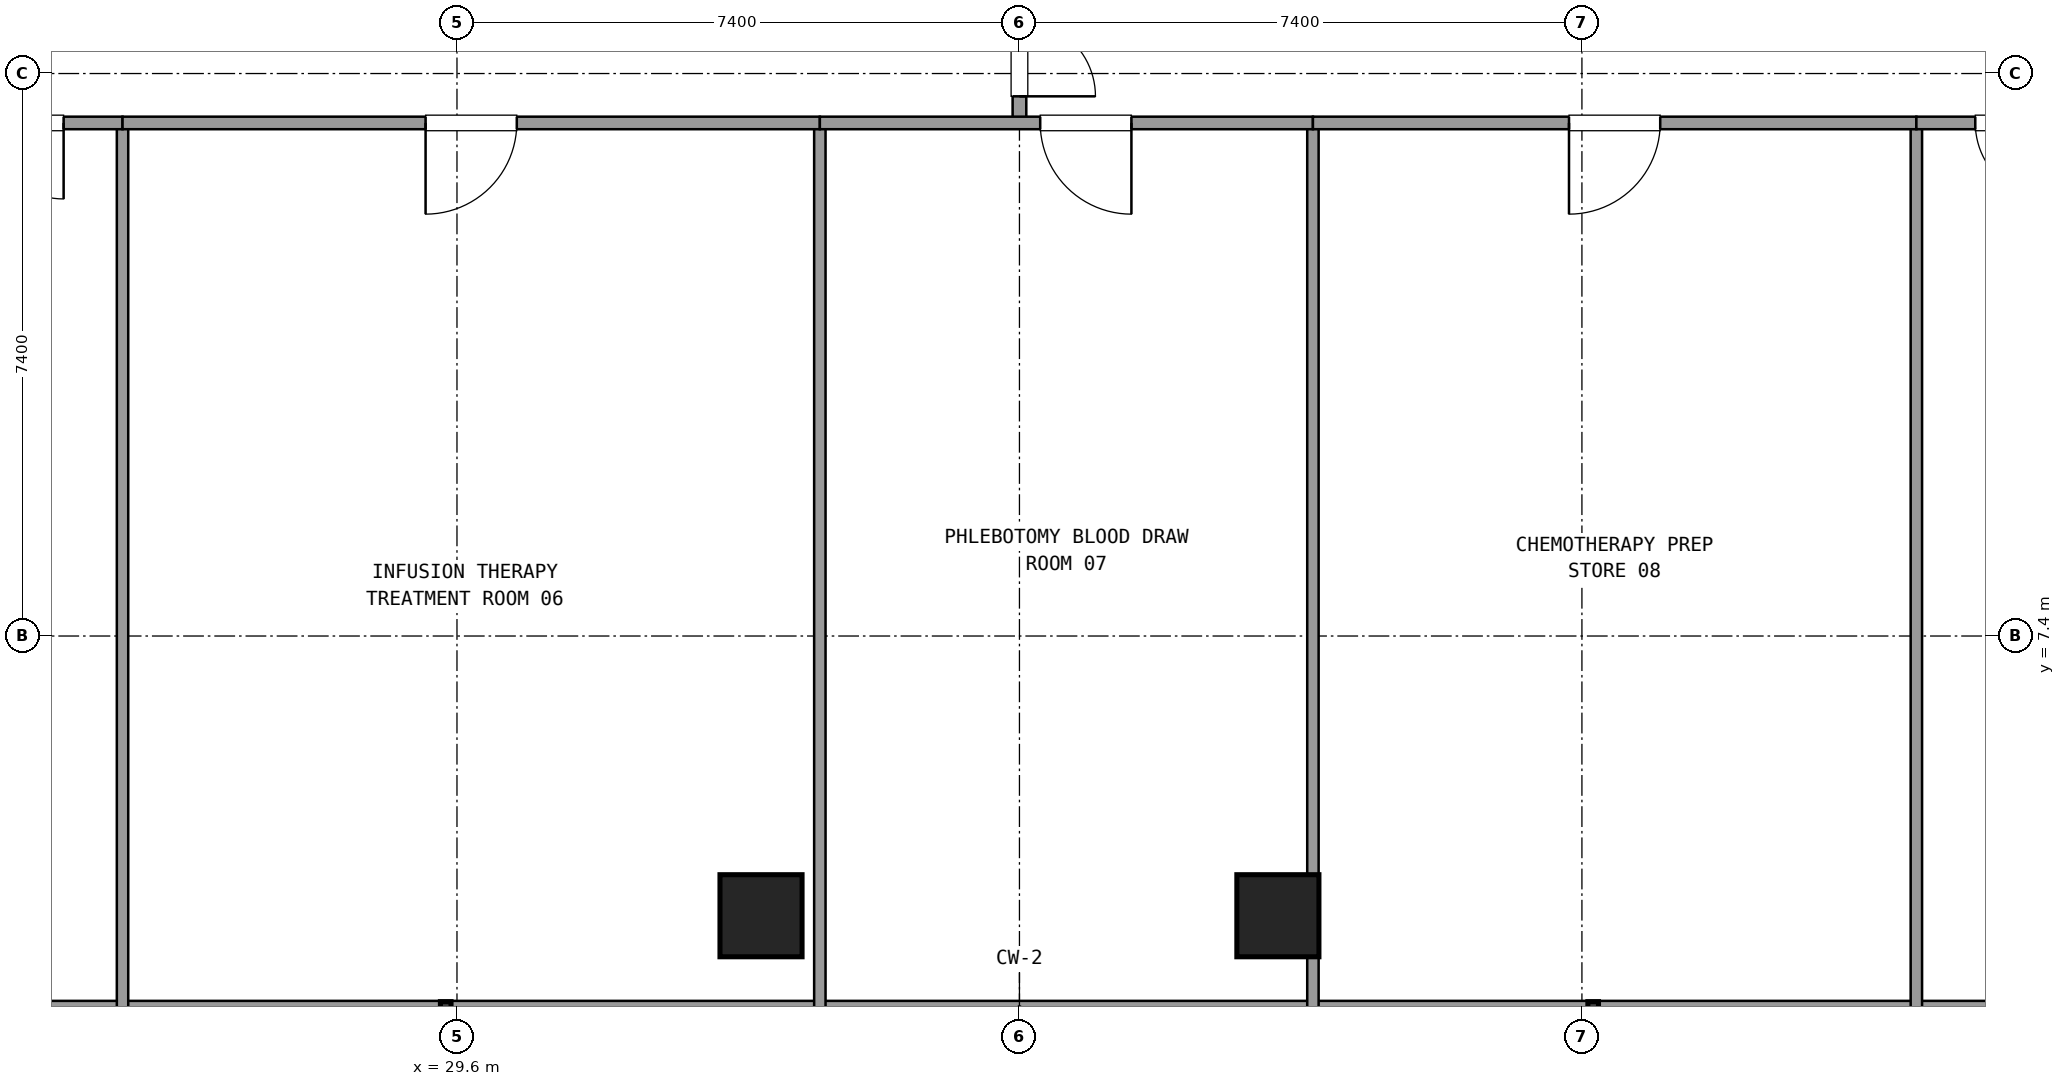
"""IFC4 building model, lengths in metres.
Left out: names, types, materials, properties, quantities, classifications, styles, units other than length and angle.
Written with IfcOpenShell. Run it as: python <this file> out.ifc"""

import sys

from ifc_helpers import new_model, si_unit, direction, frame, frame_2d, origin, origin_2d, place, context, subcontext, project, spatial, rectangle, extrude, element, fill, save


model = new_model("IFC4")
c1 = context("Model", 3, precision=1e-05, world=origin(), true_north=direction((0.0, 1.0)))
c2 = subcontext(c1, "Body", "Model", "MODEL_VIEW")
j1 = project(units=[si_unit("LENGTHUNIT", "METRE"), si_unit("PLANEANGLEUNIT", "RADIAN")], contexts=[c1])
p1 = place(None, origin())
s1 = spatial("IfcSite", under=j1, at=p1, CompositionType="ELEMENT")
p2 = place(p1, origin())
s2 = spatial("IfcBuilding", under=s1, at=p2, CompositionType="ELEMENT")
p3 = place(p2, frame((0.0, 0.0, 59.94)))
s3 = spatial("IfcBuildingStorey", under=s2, at=p3, CompositionType="ELEMENT", Elevation=59.94)
for number, where, z_axis, x_axis in (
    (1, (33.6, 3.72, 0.0), (0.0, 0.0, 1.0), (1.0, 0.0, 0.0)),
    (2, (40.4, 3.72, 0.0), (0.0, 0.0, 1.0), (1.0, 0.0, 0.0)),
):
    element("IfcColumn", number, at=place(p3, frame(where, z_axis=z_axis, x_axis=x_axis)), inside=s3, PredefinedType="COLUMN", context=c2, shape_type="SweptSolid", body=[
        extrude(rectangle(XDim=1.08, YDim=1.08, at=origin_2d()), origin(), (0.0, 0.0, 1.0), 3.6),
    ])
p4 = place(p3, frame((14.355, 2.48, 0.0), z_axis=(0.0, 0.0, 1.0), x_axis=(1.0, 0.0, 0.0)))
e3 = element("IfcWall", 3, at=p4, inside=s3, PredefinedType="SOLIDWALL", context=c2, shape_type="SweptSolid", body=[
    extrude(rectangle(XDim=45.29, YDim=0.24, at=frame_2d((22.645, 0.0))), origin(), (0.0, 0.0, 1.0), 0.85),
])
p5 = place(p3, frame((37.0, 14.15, 0.0), z_axis=(0.0, 0.0, 1.0), x_axis=(0.0, 1.0, 0.0)))
e4 = element("IfcWall", 4, at=p5, inside=s3, PredefinedType="PARTITIONING", context=c2, shape_type="SweptSolid", body=[
    extrude(rectangle(XDim=2.7, YDim=0.18, at=frame_2d((1.35, 0.0))), origin(), (0.0, 0.0, 1.0), 2.61),
])
p6 = place(p5, frame((0.35, 0.0, 0.0)))
e5 = element("IfcOpeningElement", 5, at=p6, cuts=e4, PredefinedType="OPENING", context=c2, shape_type="SweptSolid", body=[
    extrude(rectangle(XDim=2.0, YDim=2.2, at=frame_2d((1.0, 1.1))), frame((0.0, 0.1, 0.0), z_axis=(0.0, -1.0, 0.0), x_axis=(1.0, 0.0, 0.0)), (0.0, 0.0, 1.0), 0.2),
])
p7 = place(p3, frame((25.2, 14.15, 0.0), z_axis=(0.0, 0.0, 1.0), x_axis=(0.0, -1.0, 0.0)))
e6 = element("IfcWall", 6, at=p7, inside=s3, PredefinedType="PARTITIONING", context=c2, shape_type="SweptSolid", body=[
    extrude(rectangle(XDim=11.65, YDim=0.15, at=frame_2d((5.825, 0.0))), origin(), (0.0, 0.0, 1.0), 2.61),
])
p8 = place(p3, frame((22.65, 14.15, 0.0), z_axis=(0.0, 0.0, 1.0), x_axis=(1.0, 0.0, 0.0)))
e7 = element("IfcWall", 7, at=p8, inside=s3, PredefinedType="PARTITIONING", context=c2, shape_type="SweptSolid", body=[
    extrude(rectangle(XDim=2.55, YDim=0.165, at=frame_2d((1.275, 0.0))), origin(), (0.0, 0.0, 1.0), 2.61),
])
p9 = place(p8, frame((0.775, 0.0, 0.0)))
e8 = element("IfcOpeningElement", 8, at=p9, cuts=e7, PredefinedType="OPENING", context=c2, shape_type="SweptSolid", body=[
    extrude(rectangle(XDim=1.0, YDim=2.15, at=frame_2d((0.5, 1.075))), frame((0.0, 0.093, 0.0), z_axis=(0.0, -1.0, 0.0), x_axis=(1.0, 0.0, 0.0)), (0.0, 0.0, 1.0), 0.185),
])
p10 = place(p3, frame((34.374, 14.15, 0.0), z_axis=(0.0, 0.0, 1.0), x_axis=(0.0, -1.0, 0.0)))
e9 = element("IfcWall", 9, at=p10, inside=s3, PredefinedType="PARTITIONING", context=c2, shape_type="SweptSolid", body=[
    extrude(rectangle(XDim=11.65, YDim=0.15, at=frame_2d((5.825, 0.0))), origin(), (0.0, 0.0, 1.0), 2.61),
])
p11 = place(p3, frame((25.2, 14.15, 0.0), z_axis=(0.0, 0.0, 1.0), x_axis=(1.0, 0.0, 0.0)))
e10 = element("IfcWall", 10, at=p11, inside=s3, PredefinedType="PARTITIONING", context=c2, shape_type="SweptSolid", body=[
    extrude(rectangle(XDim=9.174, YDim=0.165, at=frame_2d((4.587, 0.0))), origin(), (0.0, 0.0, 1.0), 2.61),
])
p12 = place(p11, frame((3.987, 0.0, 0.0)))
e11 = element("IfcOpeningElement", 11, at=p12, cuts=e10, PredefinedType="OPENING", context=c2, shape_type="SweptSolid", body=[
    extrude(rectangle(XDim=1.2, YDim=2.15, at=frame_2d((0.6, 1.075))), frame((0.0, 0.093, 0.0), z_axis=(0.0, -1.0, 0.0), x_axis=(1.0, 0.0, 0.0)), (0.0, 0.0, 1.0), 0.185),
])
p13 = place(p3, frame((40.861, 14.15, 0.0), z_axis=(0.0, 0.0, 1.0), x_axis=(0.0, -1.0, 0.0)))
e12 = element("IfcWall", 12, at=p13, inside=s3, PredefinedType="PARTITIONING", context=c2, shape_type="SweptSolid", body=[
    extrude(rectangle(XDim=11.65, YDim=0.15, at=frame_2d((5.825, 0.0))), origin(), (0.0, 0.0, 1.0), 2.61),
])
p14 = place(p3, frame((34.374, 14.15, 0.0), z_axis=(0.0, 0.0, 1.0), x_axis=(1.0, 0.0, 0.0)))
e13 = element("IfcWall", 13, at=p14, inside=s3, PredefinedType="PARTITIONING", context=c2, shape_type="SweptSolid", body=[
    extrude(rectangle(XDim=6.487, YDim=0.165, at=frame_2d((3.244, 0.0))), origin(), (0.0, 0.0, 1.0), 2.61),
])
p15 = place(p14, frame((2.899, 0.0, 0.0)))
e14 = element("IfcOpeningElement", 14, at=p15, cuts=e13, PredefinedType="OPENING", context=c2, shape_type="SweptSolid", body=[
    extrude(rectangle(XDim=1.2, YDim=2.15, at=frame_2d((0.6, 1.075))), frame((0.0, 0.093, 0.0), z_axis=(0.0, -1.0, 0.0), x_axis=(1.0, 0.0, 0.0)), (0.0, 0.0, 1.0), 0.185),
])
p16 = place(p3, frame((48.8, 14.15, 0.0), z_axis=(0.0, 0.0, 1.0), x_axis=(0.0, -1.0, 0.0)))
e15 = element("IfcWall", 15, at=p16, inside=s3, PredefinedType="PARTITIONING", context=c2, shape_type="SweptSolid", body=[
    extrude(rectangle(XDim=11.65, YDim=0.15, at=frame_2d((5.825, 0.0))), origin(), (0.0, 0.0, 1.0), 2.61),
])
p17 = place(p3, frame((40.861, 14.15, 0.0), z_axis=(0.0, 0.0, 1.0), x_axis=(1.0, 0.0, 0.0)))
e16 = element("IfcWall", 16, at=p17, inside=s3, PredefinedType="PARTITIONING", context=c2, shape_type="SweptSolid", body=[
    extrude(rectangle(XDim=7.939, YDim=0.165, at=frame_2d((3.969, 0.0))), origin(), (0.0, 0.0, 1.0), 2.61),
])
p18 = place(p17, frame((3.369, 0.0, 0.0)))
e17 = element("IfcOpeningElement", 17, at=p18, cuts=e16, PredefinedType="OPENING", context=c2, shape_type="SweptSolid", body=[
    extrude(rectangle(XDim=1.2, YDim=2.15, at=frame_2d((0.6, 1.075))), frame((0.0, 0.093, 0.0), z_axis=(0.0, -1.0, 0.0), x_axis=(1.0, 0.0, 0.0)), (0.0, 0.0, 1.0), 0.185),
])
p19 = place(p3, frame((48.8, 14.15, 0.0), z_axis=(0.0, 0.0, 1.0), x_axis=(1.0, 0.0, 0.0)))
e18 = element("IfcWall", 18, at=p19, inside=s3, PredefinedType="PARTITIONING", context=c2, shape_type="SweptSolid", body=[
    extrude(rectangle(XDim=2.55, YDim=0.165, at=frame_2d((1.275, 0.0))), origin(), (0.0, 0.0, 1.0), 2.61),
])
p20 = place(p19, frame((0.775, 0.0, 0.0)))
e19 = element("IfcOpeningElement", 19, at=p20, cuts=e18, PredefinedType="OPENING", context=c2, shape_type="SweptSolid", body=[
    extrude(rectangle(XDim=1.0, YDim=2.15, at=frame_2d((0.5, 1.075))), frame((0.0, 0.093, 0.0), z_axis=(0.0, -1.0, 0.0), x_axis=(1.0, 0.0, 0.0)), (0.0, 0.0, 1.0), 0.185),
])
p21 = place(p6, frame((2.0, 0.0, 0.0), z_axis=(0.0, 0.0, 1.0), x_axis=(-1.0, 0.0, 0.0)))
e20 = element("IfcDoor", 20, at=p21, inside=s3, OperationType="DOUBLE_DOOR_SINGLE_SWING", PredefinedType="DOOR", context=c2, shape_type="SweptSolid", body=[
    extrude(rectangle(XDim=2.0, YDim=2.2, at=frame_2d((1.0, 1.1))), frame((0.0, 0.025, 0.0), z_axis=(0.0, -1.0, 0.0), x_axis=(1.0, 0.0, 0.0)), (0.0, 0.0, 1.0), 0.05),
])
fill(e5, e20)
p22 = place(p9, frame((1.0, 0.0, 0.0), z_axis=(0.0, 0.0, 1.0), x_axis=(-1.0, 0.0, 0.0)))
e21 = element("IfcDoor", 21, at=p22, inside=s3, OperationType="SINGLE_SWING_RIGHT", PredefinedType="DOOR", context=c2, shape_type="SweptSolid", body=[
    extrude(rectangle(XDim=1.0, YDim=2.15, at=frame_2d((0.5, 1.075))), frame((0.0, 0.025, 0.0), z_axis=(0.0, -1.0, 0.0), x_axis=(1.0, 0.0, 0.0)), (0.0, 0.0, 1.0), 0.05),
])
fill(e8, e21)
p23 = place(p12, frame((1.2, 0.0, 0.0), z_axis=(0.0, 0.0, 1.0), x_axis=(-1.0, 0.0, 0.0)))
e22 = element("IfcDoor", 22, at=p23, inside=s3, OperationType="SINGLE_SWING_LEFT", PredefinedType="DOOR", context=c2, shape_type="SweptSolid", body=[
    extrude(rectangle(XDim=1.2, YDim=2.15, at=frame_2d((0.6, 1.075))), frame((0.0, 0.025, 0.0), z_axis=(0.0, -1.0, 0.0), x_axis=(1.0, 0.0, 0.0)), (0.0, 0.0, 1.0), 0.05),
])
fill(e11, e22)
p24 = place(p15, frame((1.2, 0.0, 0.0), z_axis=(0.0, 0.0, 1.0), x_axis=(-1.0, 0.0, 0.0)))
e23 = element("IfcDoor", 23, at=p24, inside=s3, OperationType="SINGLE_SWING_RIGHT", PredefinedType="DOOR", context=c2, shape_type="SweptSolid", body=[
    extrude(rectangle(XDim=1.2, YDim=2.15, at=frame_2d((0.6, 1.075))), frame((0.0, 0.025, 0.0), z_axis=(0.0, -1.0, 0.0), x_axis=(1.0, 0.0, 0.0)), (0.0, 0.0, 1.0), 0.05),
])
fill(e14, e23)
p25 = place(p18, frame((1.2, 0.0, 0.0), z_axis=(0.0, 0.0, 1.0), x_axis=(-1.0, 0.0, 0.0)))
e24 = element("IfcDoor", 24, at=p25, inside=s3, OperationType="SINGLE_SWING_LEFT", PredefinedType="DOOR", context=c2, shape_type="SweptSolid", body=[
    extrude(rectangle(XDim=1.2, YDim=2.15, at=frame_2d((0.6, 1.075))), frame((0.0, 0.025, 0.0), z_axis=(0.0, -1.0, 0.0), x_axis=(1.0, 0.0, 0.0)), (0.0, 0.0, 1.0), 0.05),
])
fill(e17, e24)
p26 = place(p20, frame((1.0, 0.0, 0.0), z_axis=(0.0, 0.0, 1.0), x_axis=(-1.0, 0.0, 0.0)))
e25 = element("IfcDoor", 25, at=p26, inside=s3, OperationType="SINGLE_SWING_RIGHT", PredefinedType="DOOR", context=c2, shape_type="SweptSolid", body=[
    extrude(rectangle(XDim=1.0, YDim=2.15, at=frame_2d((0.5, 1.075))), frame((0.0, 0.025, 0.0), z_axis=(0.0, -1.0, 0.0), x_axis=(1.0, 0.0, 0.0)), (0.0, 0.0, 1.0), 0.05),
])
fill(e19, e25)
save(model, sys.argv[1])
